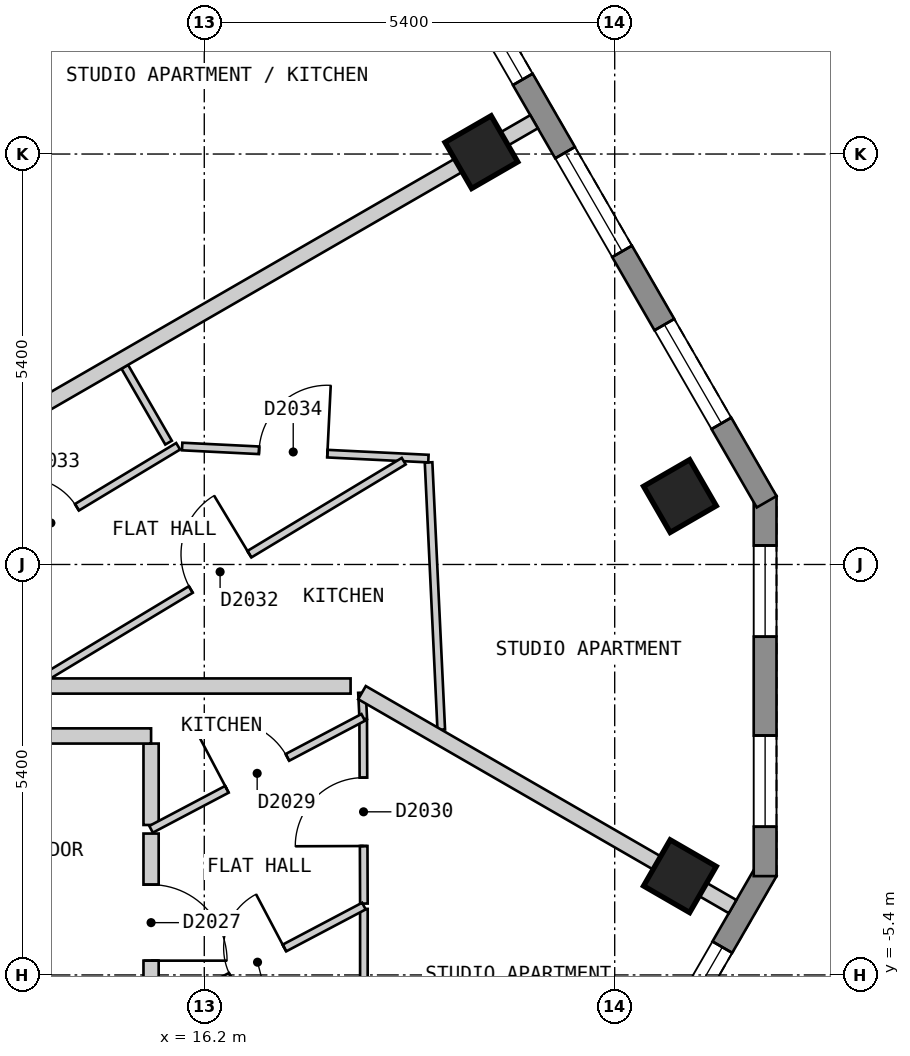
"""IFC4 building model, lengths in metres.
Left out: names, types, materials, properties, quantities, classifications, styles, units other than length and angle.
Written with IfcOpenShell. Run it as: python <this file> out.ifc"""

import sys

from ifc_helpers import new_model, si_unit, direction, frame, frame_2d, origin, origin_2d, place, context, subcontext, project, spatial, polyline, rectangle, outline, extrude, element, fill, save


model = new_model("IFC4")
c1 = context("Model", 3, precision=1e-05, world=origin(), true_north=direction((0.0, 1.0)))
c2 = subcontext(c1, "Body", "Model", "MODEL_VIEW")
j1 = project(units=[si_unit("LENGTHUNIT", "METRE"), si_unit("PLANEANGLEUNIT", "RADIAN")], contexts=[c1])
p1 = place(None, origin())
s1 = spatial("IfcSite", under=j1, at=p1, CompositionType="ELEMENT")
p2 = place(p1, origin())
s2 = spatial("IfcBuilding", under=s1, at=p2, CompositionType="ELEMENT")
p3 = place(p2, frame((0.0, 0.0, 238.8)))
s3 = spatial("IfcBuildingStorey", under=s2, at=p3, CompositionType="ELEMENT", Elevation=238.8)
for number, where, z_axis, x_axis in (
    (1, (22.458, -4.101, 0.0), (0.0, 0.0, 1.0), (0.5, 0.866, 0.0)),
    (2, (22.458, 0.9, 0.0), (0.0, 0.0, 1.0), (-0.5, 0.866, 0.0)),
    (3, (19.846, 5.425, 0.0), (0.0, 0.0, 1.0), (-0.5, 0.866, 0.0)),
):
    element("IfcColumn", number, at=place(p3, frame(where, z_axis=z_axis, x_axis=x_axis)), inside=s3, PredefinedType="COLUMN", context=c2, shape_type="SweptSolid", body=[
        extrude(rectangle(XDim=0.7, YDim=0.7, at=origin_2d()), origin(), (0.0, 0.0, 1.0), 3.0),
    ])
p4 = place(p3, frame((15.285, -18.425, 0.0), z_axis=(0.0, 0.0, 1.0), x_axis=(0.500012653391, 0.866018098222, 0.0)))
e4 = element("IfcWall", 4, at=p4, inside=s3, PredefinedType="SOLIDWALL", context=c2, shape_type="SweptSolid", body=[
    extrude(outline(polyline([(0.0, -0.15), (16.628, -0.15), (16.548, 0.15), (0.08, 0.15), (0.0, -0.15)])), origin(), (0.0, 0.0, 1.0), 2.7),
])
p5 = place(p4, frame((1.165, 0.0, 0.15)))
e5 = element("IfcOpeningElement", 5, at=p5, cuts=e4, PredefinedType="OPENING", context=c2, shape_type="SweptSolid", body=[
    extrude(rectangle(XDim=1.5, YDim=2.1, at=frame_2d((0.75, 1.05))), frame((0.0, 0.16, 0.0), z_axis=(0.0, -1.0, 0.0), x_axis=(1.0, 0.0, 0.0)), (0.0, 0.0, 1.0), 0.32),
])
p6 = place(p4, frame((3.724, 0.0, 0.15)))
e6 = element("IfcOpeningElement", 6, at=p6, cuts=e4, PredefinedType="OPENING", context=c2, shape_type="SweptSolid", body=[
    extrude(rectangle(XDim=1.5, YDim=2.1, at=frame_2d((0.75, 1.05))), frame((0.0, 0.16, 0.0), z_axis=(0.0, -1.0, 0.0), x_axis=(1.0, 0.0, 0.0)), (0.0, 0.0, 1.0), 0.32),
])
p7 = place(p4, frame((6.283, 0.0, 0.15)))
e7 = element("IfcOpeningElement", 7, at=p7, cuts=e4, PredefinedType="OPENING", context=c2, shape_type="SweptSolid", body=[
    extrude(rectangle(XDim=1.5, YDim=2.1, at=frame_2d((0.75, 1.05))), frame((0.0, 0.16, 0.0), z_axis=(0.0, -1.0, 0.0), x_axis=(1.0, 0.0, 0.0)), (0.0, 0.0, 1.0), 0.32),
])
p8 = place(p4, frame((8.843, 0.0, 0.15)))
e8 = element("IfcOpeningElement", 8, at=p8, cuts=e4, PredefinedType="OPENING", context=c2, shape_type="SweptSolid", body=[
    extrude(rectangle(XDim=1.5, YDim=2.1, at=frame_2d((0.75, 1.05))), frame((0.0, 0.16, 0.0), z_axis=(0.0, -1.0, 0.0), x_axis=(1.0, 0.0, 0.0)), (0.0, 0.0, 1.0), 0.32),
])
p9 = place(p4, frame((11.402, 0.0, 0.15)))
e9 = element("IfcOpeningElement", 9, at=p9, cuts=e4, PredefinedType="OPENING", context=c2, shape_type="SweptSolid", body=[
    extrude(rectangle(XDim=1.5, YDim=2.1, at=frame_2d((0.75, 1.05))), frame((0.0, 0.16, 0.0), z_axis=(0.0, -1.0, 0.0), x_axis=(1.0, 0.0, 0.0)), (0.0, 0.0, 1.0), 0.32),
])
p10 = place(p4, frame((13.962, 0.0, 0.15)))
e10 = element("IfcOpeningElement", 10, at=p10, cuts=e4, PredefinedType="OPENING", context=c2, shape_type="SweptSolid", body=[
    extrude(rectangle(XDim=1.5, YDim=2.1, at=frame_2d((0.75, 1.05))), frame((0.0, 0.16, 0.0), z_axis=(0.0, -1.0, 0.0), x_axis=(1.0, 0.0, 0.0)), (0.0, 0.0, 1.0), 0.32),
])
p11 = place(p3, frame((23.579, -4.1, 0.0), z_axis=(0.0, 0.0, 1.0), x_axis=(0.0, 1.0, 0.0)))
e11 = element("IfcWall", 11, at=p11, inside=s3, PredefinedType="SOLIDWALL", context=c2, shape_type="SweptSolid", body=[
    extrude(outline(polyline([(0.0, -0.15), (5.0, -0.15), (4.92, 0.15), (0.08, 0.15), (0.0, -0.15)])), origin(), (0.0, 0.0, 1.0), 2.7),
])
p12 = place(p11, frame((0.65, 0.0, 0.15)))
e12 = element("IfcOpeningElement", 12, at=p12, cuts=e11, PredefinedType="OPENING", context=c2, shape_type="SweptSolid", body=[
    extrude(rectangle(XDim=1.2, YDim=2.1, at=frame_2d((0.6, 1.05))), frame((0.0, 0.16, 0.0), z_axis=(0.0, -1.0, 0.0), x_axis=(1.0, 0.0, 0.0)), (0.0, 0.0, 1.0), 0.32),
])
p13 = place(p11, frame((3.15, 0.0, 0.15)))
e13 = element("IfcOpeningElement", 13, at=p13, cuts=e11, PredefinedType="OPENING", context=c2, shape_type="SweptSolid", body=[
    extrude(rectangle(XDim=1.2, YDim=2.1, at=frame_2d((0.6, 1.05))), frame((0.0, 0.16, 0.0), z_axis=(0.0, -1.0, 0.0), x_axis=(1.0, 0.0, 0.0)), (0.0, 0.0, 1.0), 0.32),
])
p14 = place(p3, frame((23.599, 0.825, 0.0), z_axis=(0.0, 0.0, 1.0), x_axis=(-0.500003656944, 0.866023292436, 0.0)))
e14 = element("IfcWall", 14, at=p14, inside=s3, PredefinedType="SOLIDWALL", context=c2, shape_type="SweptSolid", body=[
    extrude(outline(polyline([(0.0, -0.15), (22.17, -0.15), (22.09, 0.15), (0.08, 0.15), (0.0, -0.15)])), origin(), (0.0, 0.0, 1.0), 2.7),
])
p15 = place(p14, frame((1.191, 0.0, 0.15)))
e15 = element("IfcOpeningElement", 15, at=p15, cuts=e14, PredefinedType="OPENING", context=c2, shape_type="SweptSolid", body=[
    extrude(rectangle(XDim=1.5, YDim=2.1, at=frame_2d((0.75, 1.05))), frame((0.0, 0.16, 0.0), z_axis=(0.0, -1.0, 0.0), x_axis=(1.0, 0.0, 0.0)), (0.0, 0.0, 1.0), 0.32),
])
p16 = place(p14, frame((3.804, 0.0, 0.15)))
e16 = element("IfcOpeningElement", 16, at=p16, cuts=e14, PredefinedType="OPENING", context=c2, shape_type="SweptSolid", body=[
    extrude(rectangle(XDim=1.5, YDim=2.1, at=frame_2d((0.75, 1.05))), frame((0.0, 0.16, 0.0), z_axis=(0.0, -1.0, 0.0), x_axis=(1.0, 0.0, 0.0)), (0.0, 0.0, 1.0), 0.32),
])
p17 = place(p14, frame((6.417, 0.0, 0.15)))
e17 = element("IfcOpeningElement", 17, at=p17, cuts=e14, PredefinedType="OPENING", context=c2, shape_type="SweptSolid", body=[
    extrude(rectangle(XDim=1.5, YDim=2.1, at=frame_2d((0.75, 1.05))), frame((0.0, 0.16, 0.0), z_axis=(0.0, -1.0, 0.0), x_axis=(1.0, 0.0, 0.0)), (0.0, 0.0, 1.0), 0.32),
])
p18 = place(p14, frame((9.029, 0.0, 0.15)))
e18 = element("IfcOpeningElement", 18, at=p18, cuts=e14, PredefinedType="OPENING", context=c2, shape_type="SweptSolid", body=[
    extrude(rectangle(XDim=1.5, YDim=2.1, at=frame_2d((0.75, 1.05))), frame((0.0, 0.16, 0.0), z_axis=(0.0, -1.0, 0.0), x_axis=(1.0, 0.0, 0.0)), (0.0, 0.0, 1.0), 0.32),
])
p19 = place(p14, frame((11.641, 0.0, 0.15)))
e19 = element("IfcOpeningElement", 19, at=p19, cuts=e14, PredefinedType="OPENING", context=c2, shape_type="SweptSolid", body=[
    extrude(rectangle(XDim=1.5, YDim=2.1, at=frame_2d((0.75, 1.05))), frame((0.0, 0.16, 0.0), z_axis=(0.0, -1.0, 0.0), x_axis=(1.0, 0.0, 0.0)), (0.0, 0.0, 1.0), 0.32),
])
p20 = place(p14, frame((14.254, 0.0, 0.15)))
e20 = element("IfcOpeningElement", 20, at=p20, cuts=e14, PredefinedType="OPENING", context=c2, shape_type="SweptSolid", body=[
    extrude(rectangle(XDim=1.5, YDim=2.1, at=frame_2d((0.75, 1.05))), frame((0.0, 0.16, 0.0), z_axis=(0.0, -1.0, 0.0), x_axis=(1.0, 0.0, 0.0)), (0.0, 0.0, 1.0), 0.32),
])
p21 = place(p14, frame((16.866, 0.0, 0.15)))
e21 = element("IfcOpeningElement", 21, at=p21, cuts=e14, PredefinedType="OPENING", context=c2, shape_type="SweptSolid", body=[
    extrude(rectangle(XDim=1.5, YDim=2.1, at=frame_2d((0.75, 1.05))), frame((0.0, 0.16, 0.0), z_axis=(0.0, -1.0, 0.0), x_axis=(1.0, 0.0, 0.0)), (0.0, 0.0, 1.0), 0.32),
])
p22 = place(p14, frame((19.479, 0.0, 0.15)))
e22 = element("IfcOpeningElement", 22, at=p22, cuts=e14, PredefinedType="OPENING", context=c2, shape_type="SweptSolid", body=[
    extrude(rectangle(XDim=1.5, YDim=2.1, at=frame_2d((0.75, 1.05))), frame((0.0, 0.16, 0.0), z_axis=(0.0, -1.0, 0.0), x_axis=(1.0, 0.0, 0.0)), (0.0, 0.0, 1.0), 0.32),
])
p23 = place(p3, frame((15.5, -2.356, 0.0), z_axis=(0.0, 0.0, 1.0), x_axis=(0.0, -1.0, 0.0)))
e23 = element("IfcWall", 23, at=p23, inside=s3, PredefinedType="PARTITIONING", context=c2, shape_type="SweptSolid", body=[
    extrude(rectangle(XDim=1.071, YDim=0.2, at=frame_2d((0.536, 0.0))), origin(), (0.0, 0.0, 1.0), 2.7),
])
p24 = place(p3, frame((12.902, -2.256, 0.0), z_axis=(0.0, 0.0, 1.0), x_axis=(1.0, 0.0, 0.0)))
e24 = element("IfcWall", 24, at=p24, inside=s3, PredefinedType="PARTITIONING", context=c2, shape_type="SweptSolid", body=[
    extrude(rectangle(XDim=2.598, YDim=0.2, at=frame_2d((1.299, 0.0))), origin(), (0.0, 0.0, 1.0), 2.7),
])
p25 = place(p3, frame((15.5, -5.856, 0.0), z_axis=(0.0, 0.0, 1.0), x_axis=(0.0, 1.0, 0.0)))
e25 = element("IfcWall", 25, at=p25, inside=s3, PredefinedType="PARTITIONING", context=c2, shape_type="SweptSolid", body=[
    extrude(rectangle(XDim=2.316, YDim=0.2, at=frame_2d((1.158, 0.0))), origin(), (0.0, 0.0, 1.0), 2.7),
])
p26 = place(p25, frame((0.644, 0.0, 0.0)))
e26 = element("IfcOpeningElement", 26, at=p26, cuts=e25, PredefinedType="OPENING", context=c2, shape_type="SweptSolid", body=[
    extrude(rectangle(XDim=1.0, YDim=2.1, at=frame_2d((0.5, 1.05))), frame((0.0, 0.11, 0.0), z_axis=(0.0, -1.0, 0.0), x_axis=(1.0, 0.0, 0.0)), (0.0, 0.0, 1.0), 0.22),
])
p27 = place(p3, frame((15.154, 2.601, 0.0), z_axis=(0.0, 0.0, 1.0), x_axis=(0.499808046739, -0.866136199691, 0.0)))
e27 = element("IfcWall", 27, at=p27, inside=s3, PredefinedType="PARTITIONING", context=c2, shape_type="SweptSolid", body=[
    extrude(rectangle(XDim=1.152, YDim=0.1, at=frame_2d((0.576, 0.0))), origin(), (0.0, 0.0, 1.0), 2.7),
])
p28 = place(p3, frame((18.275, -1.686, 0.0), z_axis=(0.0, 0.0, 1.0), x_axis=(0.049063646166, -0.998795654088, 0.0)))
e28 = element("IfcWall", 28, at=p28, inside=s3, PredefinedType="PARTITIONING", context=c2, shape_type="SweptSolid", body=[
    extrude(rectangle(XDim=0.348, YDim=0.1, at=frame_2d((0.174, 0.0))), origin(), (0.0, 0.0, 1.0), 2.7),
])
p29 = place(p3, frame((19.151, 1.343, 0.0), z_axis=(0.0, 0.0, 1.0), x_axis=(0.047509130714, -0.998870803707, 0.0)))
e29 = element("IfcWall", 29, at=p29, inside=s3, PredefinedType="PARTITIONING", context=c2, shape_type="SweptSolid", body=[
    extrude(rectangle(XDim=3.52, YDim=0.1, at=frame_2d((1.76, 0.0))), origin(), (0.0, 0.0, 1.0), 2.7),
])
p30 = place(p3, frame((18.291, -2.048, 0.0), z_axis=(0.0, 0.0, 1.0), x_axis=(0.003743776253, -0.999992992045, 0.0)))
e30 = element("IfcWall", 30, at=p30, inside=s3, PredefinedType="PARTITIONING", context=c2, shape_type="SweptSolid", body=[
    extrude(rectangle(XDim=2.413, YDim=0.1, at=frame_2d((1.207, 0.0))), origin(), (0.0, 0.0, 1.0), 2.7),
])
p31 = place(p30, frame((0.756, 0.0, 0.0)))
e31 = element("IfcOpeningElement", 31, at=p31, cuts=e30, PredefinedType="OPENING", context=c2, shape_type="SweptSolid", body=[
    extrude(rectangle(XDim=0.9, YDim=2.1, at=frame_2d((0.45, 1.05))), frame((0.0, 0.06, 0.0), z_axis=(0.0, -1.0, 0.0), x_axis=(1.0, 0.0, 0.0)), (0.0, 0.0, 1.0), 0.12),
])
p32 = place(p3, frame((15.909, 1.552, 0.0), z_axis=(0.0, 0.0, 1.0), x_axis=(0.998799003463, -0.048995414909, 0.0)))
e32 = element("IfcWall", 32, at=p32, inside=s3, PredefinedType="PARTITIONING", context=c2, shape_type="SweptSolid", body=[
    extrude(rectangle(XDim=3.244, YDim=0.1, at=frame_2d((1.622, 0.0))), origin(), (0.0, 0.0, 1.0), 2.7),
])
p33 = place(p32, frame((1.013, 0.0, 0.0)))
e33 = element("IfcOpeningElement", 33, at=p33, cuts=e32, PredefinedType="OPENING", context=c2, shape_type="SweptSolid", body=[
    extrude(rectangle(XDim=0.9, YDim=2.1, at=frame_2d((0.45, 1.05))), frame((0.0, 0.06, 0.0), z_axis=(0.0, -1.0, 0.0), x_axis=(1.0, 0.0, 0.0)), (0.0, 0.0, 1.0), 0.12),
])
p34 = place(p3, frame((18.3, -7.496, 0.0), z_axis=(0.0, 0.0, 1.0), x_axis=(0.0, 1.0, 0.0)))
e34 = element("IfcWall", 34, at=p34, inside=s3, PredefinedType="PARTITIONING", context=c2, shape_type="SweptSolid", body=[
    extrude(rectangle(XDim=2.965, YDim=0.1, at=frame_2d((1.482, 0.0))), origin(), (0.0, 0.0, 1.0), 2.7),
])
p35 = place(p3, frame((15.5, -3.484, 0.0), z_axis=(0.0, 0.0, 1.0), x_axis=(0.884530210683, 0.466482911145, 0.0)))
e35 = element("IfcWall", 35, at=p35, inside=s3, PredefinedType="PARTITIONING", context=c2, shape_type="SweptSolid", body=[
    extrude(rectangle(XDim=3.155, YDim=0.1, at=frame_2d((1.578, 0.0))), origin(), (0.0, 0.0, 1.0), 2.7),
])
p36 = place(p35, frame((1.128, 0.0, 0.0)))
e36 = element("IfcOpeningElement", 36, at=p36, cuts=e35, PredefinedType="OPENING", context=c2, shape_type="SweptSolid", body=[
    extrude(rectangle(XDim=0.9, YDim=2.1, at=frame_2d((0.45, 1.05))), frame((0.0, 0.06, 0.0), z_axis=(0.0, -1.0, 0.0), x_axis=(1.0, 0.0, 0.0)), (0.0, 0.0, 1.0), 0.12),
])
p37 = place(p3, frame((15.605, -5.916, 0.0), z_axis=(0.0, 0.0, 1.0), x_axis=(0.884422415573, 0.466687251627, 0.0)))
e37 = element("IfcWall", 37, at=p37, inside=s3, PredefinedType="PARTITIONING", context=c2, shape_type="SweptSolid", body=[
    extrude(rectangle(XDim=3.047, YDim=0.1, at=frame_2d((1.524, 0.0))), origin(), (0.0, 0.0, 1.0), 2.7),
])
p38 = place(p37, frame((1.065, 0.0, 0.0)))
e38 = element("IfcOpeningElement", 38, at=p38, cuts=e37, PredefinedType="OPENING", context=c2, shape_type="SweptSolid", body=[
    extrude(rectangle(XDim=0.8, YDim=2.1, at=frame_2d((0.4, 1.05))), frame((0.0, 0.06, 0.0), z_axis=(0.0, -1.0, 0.0), x_axis=(1.0, 0.0, 0.0)), (0.0, 0.0, 1.0), 0.12),
])
p39 = place(p3, frame((12.593, -0.411, 0.0), z_axis=(0.0, 0.0, 1.0), x_axis=(0.856558445359, 0.516050026339, 0.0)))
e39 = element("IfcWall", 39, at=p39, inside=s3, PredefinedType="PARTITIONING", context=c2, shape_type="SweptSolid", body=[
    extrude(rectangle(XDim=3.809, YDim=0.1, at=frame_2d((1.905, 0.0))), origin(), (0.0, 0.0, 1.0), 2.7),
])
p40 = place(p39, frame((1.455, 0.0, 0.0)))
e40 = element("IfcOpeningElement", 40, at=p40, cuts=e39, PredefinedType="OPENING", context=c2, shape_type="SweptSolid", body=[
    extrude(rectangle(XDim=0.8, YDim=2.1, at=frame_2d((0.4, 1.05))), frame((0.0, 0.06, 0.0), z_axis=(0.0, -1.0, 0.0), x_axis=(1.0, 0.0, 0.0)), (0.0, 0.0, 1.0), 0.12),
])
p41 = place(p3, frame((14.081, -1.499, 0.0), z_axis=(0.0, 0.0, 1.0), x_axis=(0.85652273816, 0.516109289798, 0.0)))
e41 = element("IfcWall", 41, at=p41, inside=s3, PredefinedType="PARTITIONING", context=c2, shape_type="SweptSolid", body=[
    extrude(rectangle(XDim=5.537, YDim=0.1, at=frame_2d((2.769, 0.0))), origin(), (0.0, 0.0, 1.0), 2.7),
])
p42 = place(p41, frame((2.267, 0.0, 0.0)))
e42 = element("IfcOpeningElement", 42, at=p42, cuts=e41, PredefinedType="OPENING", context=c2, shape_type="SweptSolid", body=[
    extrude(rectangle(XDim=0.9, YDim=2.1, at=frame_2d((0.45, 1.05))), frame((0.0, 0.06, 0.0), z_axis=(0.0, -1.0, 0.0), x_axis=(1.0, 0.0, 0.0)), (0.0, 0.0, 1.0), 0.12),
])
p43 = place(p3, frame((18.275, -1.686, 0.0), z_axis=(0.0, 0.0, 1.0), x_axis=(0.866041167766, -0.49997269499, 0.0)))
e43 = element("IfcWall", 43, at=p43, inside=s3, PredefinedType="PARTITIONING", context=c2, shape_type="SweptSolid", body=[
    extrude(rectangle(XDim=5.63, YDim=0.2, at=frame_2d((2.815, 0.0))), origin(), (0.0, 0.0, 1.0), 2.7),
])
p44 = place(p3, frame((13.163, -1.599, 0.0), z_axis=(0.0, 0.0, 1.0), x_axis=(1.0, 0.0, 0.0)))
e44 = element("IfcWall", 44, at=p44, inside=s3, PredefinedType="PARTITIONING", context=c2, shape_type="SweptSolid", body=[
    extrude(rectangle(XDim=4.962, YDim=0.2, at=frame_2d((2.481, 0.0))), origin(), (0.0, 0.0, 1.0), 2.7),
])
p45 = place(p3, frame((11.879, 0.826, 0.0), z_axis=(0.0, 0.0, 1.0), x_axis=(0.866065245018, 0.499930986609, 0.0)))
e45 = element("IfcWall", 45, at=p45, inside=s3, PredefinedType="PARTITIONING", context=c2, shape_type="SweptSolid", body=[
    extrude(rectangle(XDim=10.0, YDim=0.2, at=frame_2d((5.0, 0.0))), origin(), (0.0, 0.0, 1.0), 2.7),
])
p46 = place(p3, frame((9.354, 5.401, 0.0), z_axis=(0.0, 0.0, 1.0), x_axis=(0.866018411306, 0.500012111133, 0.0)))
e46 = element("IfcWall", 46, at=p46, inside=s3, PredefinedType="PARTITIONING", context=c2, shape_type="SweptSolid", body=[
    extrude(rectangle(XDim=9.898, YDim=0.2, at=frame_2d((4.949, 0.0))), origin(), (0.0, 0.0, 1.0), 2.7),
])
p47 = place(p10, origin())
e47 = element("IfcWindow", 47, at=p47, inside=s3, PartitioningType="SINGLE_PANEL", PredefinedType="WINDOW", context=c2, shape_type="SweptSolid", body=[
    extrude(rectangle(XDim=1.5, YDim=2.1, at=frame_2d((0.75, 1.05))), frame((0.0, 0.03, 0.0), z_axis=(0.0, -1.0, 0.0), x_axis=(1.0, 0.0, 0.0)), (0.0, 0.0, 1.0), 0.06),
])
fill(e10, e47)
p48 = place(p12, origin())
e48 = element("IfcWindow", 48, at=p48, inside=s3, PartitioningType="SINGLE_PANEL", PredefinedType="WINDOW", context=c2, shape_type="SweptSolid", body=[
    extrude(rectangle(XDim=1.2, YDim=2.1, at=frame_2d((0.6, 1.05))), frame((0.0, 0.03, 0.0), z_axis=(0.0, -1.0, 0.0), x_axis=(1.0, 0.0, 0.0)), (0.0, 0.0, 1.0), 0.06),
])
fill(e12, e48)
p49 = place(p13, origin())
e49 = element("IfcWindow", 49, at=p49, inside=s3, PartitioningType="SINGLE_PANEL", PredefinedType="WINDOW", context=c2, shape_type="SweptSolid", body=[
    extrude(rectangle(XDim=1.2, YDim=2.1, at=frame_2d((0.6, 1.05))), frame((0.0, 0.03, 0.0), z_axis=(0.0, -1.0, 0.0), x_axis=(1.0, 0.0, 0.0)), (0.0, 0.0, 1.0), 0.06),
])
fill(e13, e49)
p50 = place(p15, origin())
e50 = element("IfcWindow", 50, at=p50, inside=s3, PartitioningType="SINGLE_PANEL", PredefinedType="WINDOW", context=c2, shape_type="SweptSolid", body=[
    extrude(rectangle(XDim=1.5, YDim=2.1, at=frame_2d((0.75, 1.05))), frame((0.0, 0.03, 0.0), z_axis=(0.0, -1.0, 0.0), x_axis=(1.0, 0.0, 0.0)), (0.0, 0.0, 1.0), 0.06),
])
fill(e15, e50)
p51 = place(p16, origin())
e51 = element("IfcWindow", 51, at=p51, inside=s3, PartitioningType="SINGLE_PANEL", PredefinedType="WINDOW", context=c2, shape_type="SweptSolid", body=[
    extrude(rectangle(XDim=1.5, YDim=2.1, at=frame_2d((0.75, 1.05))), frame((0.0, 0.03, 0.0), z_axis=(0.0, -1.0, 0.0), x_axis=(1.0, 0.0, 0.0)), (0.0, 0.0, 1.0), 0.06),
])
fill(e16, e51)
p52 = place(p17, origin())
e52 = element("IfcWindow", 52, at=p52, inside=s3, PartitioningType="SINGLE_PANEL", PredefinedType="WINDOW", context=c2, shape_type="SweptSolid", body=[
    extrude(rectangle(XDim=1.5, YDim=2.1, at=frame_2d((0.75, 1.05))), frame((0.0, 0.03, 0.0), z_axis=(0.0, -1.0, 0.0), x_axis=(1.0, 0.0, 0.0)), (0.0, 0.0, 1.0), 0.06),
])
fill(e17, e52)
p53 = place(p26, origin())
e53 = element("IfcDoor", 53, at=p53, inside=s3, OperationType="SINGLE_SWING_LEFT", PredefinedType="DOOR", context=c2, shape_type="SweptSolid", body=[
    extrude(rectangle(XDim=1.0, YDim=2.1, at=frame_2d((0.5, 1.05))), frame((0.0, 0.025, 0.0), z_axis=(0.0, -1.0, 0.0), x_axis=(1.0, 0.0, 0.0)), (0.0, 0.0, 1.0), 0.05),
])
fill(e26, e53)
p54 = place(p38, origin())
e54 = element("IfcDoor", 54, at=p54, inside=s3, OperationType="SINGLE_SWING_RIGHT", PredefinedType="DOOR", context=c2, shape_type="SweptSolid", body=[
    extrude(rectangle(XDim=0.8, YDim=2.1, at=frame_2d((0.4, 1.05))), frame((0.0, 0.025, 0.0), z_axis=(0.0, -1.0, 0.0), x_axis=(1.0, 0.0, 0.0)), (0.0, 0.0, 1.0), 0.05),
])
fill(e38, e54)
p55 = place(p36, origin())
e55 = element("IfcDoor", 55, at=p55, inside=s3, OperationType="SINGLE_SWING_LEFT", PredefinedType="DOOR", context=c2, shape_type="SweptSolid", body=[
    extrude(rectangle(XDim=0.9, YDim=2.1, at=frame_2d((0.45, 1.05))), frame((0.0, 0.025, 0.0), z_axis=(0.0, -1.0, 0.0), x_axis=(1.0, 0.0, 0.0)), (0.0, 0.0, 1.0), 0.05),
])
fill(e36, e55)
p56 = place(p31, origin())
e56 = element("IfcDoor", 56, at=p56, inside=s3, OperationType="SINGLE_SWING_RIGHT", PredefinedType="DOOR", context=c2, shape_type="SweptSolid", body=[
    extrude(rectangle(XDim=0.9, YDim=2.1, at=frame_2d((0.45, 1.05))), frame((0.0, 0.025, 0.0), z_axis=(0.0, -1.0, 0.0), x_axis=(1.0, 0.0, 0.0)), (0.0, 0.0, 1.0), 0.05),
])
fill(e31, e56)
p57 = place(p42, origin())
e57 = element("IfcDoor", 57, at=p57, inside=s3, OperationType="SINGLE_SWING_RIGHT", PredefinedType="DOOR", context=c2, shape_type="SweptSolid", body=[
    extrude(rectangle(XDim=0.9, YDim=2.1, at=frame_2d((0.45, 1.05))), frame((0.0, 0.025, 0.0), z_axis=(0.0, -1.0, 0.0), x_axis=(1.0, 0.0, 0.0)), (0.0, 0.0, 1.0), 0.05),
])
fill(e42, e57)
p58 = place(p40, origin())
e58 = element("IfcDoor", 58, at=p58, inside=s3, OperationType="SINGLE_SWING_LEFT", PredefinedType="DOOR", context=c2, shape_type="SweptSolid", body=[
    extrude(rectangle(XDim=0.8, YDim=2.1, at=frame_2d((0.4, 1.05))), frame((0.0, 0.025, 0.0), z_axis=(0.0, -1.0, 0.0), x_axis=(1.0, 0.0, 0.0)), (0.0, 0.0, 1.0), 0.05),
])
fill(e40, e58)
p59 = place(p33, origin())
e59 = element("IfcDoor", 59, at=p59, inside=s3, OperationType="SINGLE_SWING_RIGHT", PredefinedType="DOOR", context=c2, shape_type="SweptSolid", body=[
    extrude(rectangle(XDim=0.9, YDim=2.1, at=frame_2d((0.45, 1.05))), frame((0.0, 0.025, 0.0), z_axis=(0.0, -1.0, 0.0), x_axis=(1.0, 0.0, 0.0)), (0.0, 0.0, 1.0), 0.05),
])
fill(e33, e59)
save(model, sys.argv[1])
